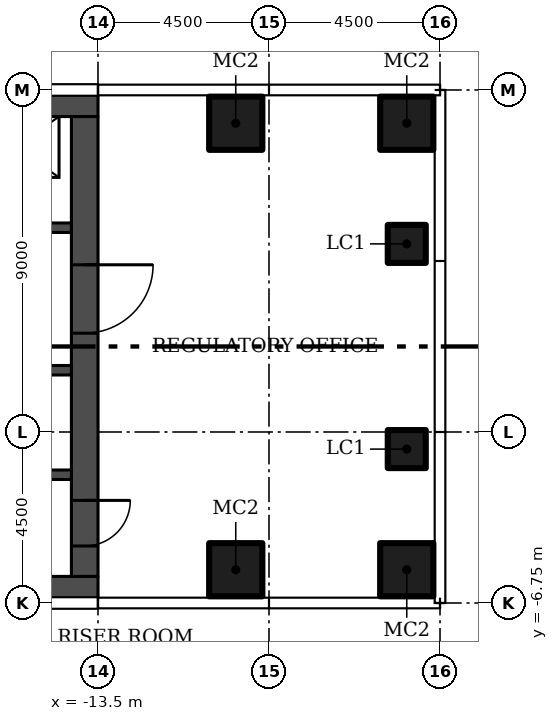
"""IFC4 building model, lengths in metres.
Left out: names, types, materials, properties, quantities, classifications, styles, units other than length and angle.
Written with IfcOpenShell. Run it as: python <this file> out.ifc"""

import sys

from ifc_helpers import new_model, si_unit, direction, frame, frame_2d, origin, origin_2d, place, context, subcontext, project, spatial, rectangle, hollow_rectangle, extrude, element, fill, save


model = new_model("IFC4")
c1 = context("Model", 3, precision=1e-05, world=origin(), true_north=direction((0.0, 1.0)))
c2 = subcontext(c1, "Body", "Model", "MODEL_VIEW")
j1 = project(units=[si_unit("LENGTHUNIT", "METRE"), si_unit("PLANEANGLEUNIT", "RADIAN")], contexts=[c1])
p1 = place(None, origin())
s1 = spatial("IfcSite", under=j1, at=p1, CompositionType="ELEMENT")
p2 = place(p1, origin())
s2 = spatial("IfcBuilding", under=s1, at=p2, CompositionType="ELEMENT")
p3 = place(p2, frame((0.0, 0.0, 69.3)))
s3 = spatial("IfcBuildingStorey", under=s2, at=p3, CompositionType="ELEMENT", Elevation=69.3)
for number, where in (
    (1, (-9.875, -5.875, 0.0)),
    (2, (-5.375, -5.875, 0.0)),
    (3, (-9.875, 5.875, 0.0)),
    (4, (-5.375, 5.875, 0.0)),
):
    element("IfcColumn", number, at=place(p3, frame(where)), inside=s3, PredefinedType="COLUMN", context=c2, shape_type="SweptSolid", body=[
        extrude(hollow_rectangle(XDim=1.4, YDim=1.4, WallThickness=0.05, at=origin_2d()), origin(), (0.0, 0.0, 1.0), 3.55),
    ])
for number, where in (
    (5, (-5.375, -2.7, 0.0)),
    (6, (-5.375, 2.7, 0.0)),
):
    element("IfcColumn", number, at=place(p3, frame(where)), inside=s3, PredefinedType="COLUMN", context=c2, shape_type="SweptSolid", body=[
        extrude(hollow_rectangle(XDim=1.0, YDim=1.0, WallThickness=0.04, at=origin_2d()), origin(), (0.0, 0.0, 1.0), 3.55),
    ])
for number, where in (
    (7, (-27.0, -6.4, 0.0)),
    (8, (-27.0, 6.4, 0.0)),
):
    element("IfcWall", number, at=place(p3, frame(where)), inside=s3, PredefinedType="SHEAR", context=c2, shape_type="SweptSolid", body=[
        extrude(rectangle(XDim=13.5, YDim=0.7, at=frame_2d((6.75, 0.0))), origin(), (0.0, 0.0, 1.0), 3.55),
    ])
p4 = place(p3, frame((-13.85, 6.05, 0.0), z_axis=(0.0, 0.0, 1.0), x_axis=(0.0, -1.0, 0.0)))
e9 = element("IfcWall", 9, at=p4, inside=s3, PredefinedType="SHEAR", context=c2, shape_type="SweptSolid", body=[
    extrude(rectangle(XDim=12.1, YDim=0.7, at=frame_2d((6.05, 0.0))), origin(), (0.0, 0.0, 1.0), 3.55),
])
p5 = place(p4, frame((10.1, 0.0, 0.0)))
e10 = element("IfcOpeningElement", 10, at=p5, cuts=e9, PredefinedType="OPENING", context=c2, shape_type="SweptSolid", body=[
    extrude(rectangle(XDim=1.2, YDim=2.1, at=frame_2d((0.6, 1.05))), frame((0.0, 0.36, 0.0), z_axis=(0.0, -1.0, 0.0), x_axis=(1.0, 0.0, 0.0)), (0.0, 0.0, 1.0), 0.72),
])
p6 = place(p4, frame((3.9, 0.0, 0.0)))
e11 = element("IfcOpeningElement", 11, at=p6, cuts=e9, PredefinedType="OPENING", context=c2, shape_type="SweptSolid", body=[
    extrude(rectangle(XDim=1.8, YDim=2.4, at=frame_2d((0.9, 1.2))), frame((0.0, 0.36, 0.0), z_axis=(0.0, -1.0, 0.0), x_axis=(1.0, 0.0, 0.0)), (0.0, 0.0, 1.0), 0.72),
])
p7 = place(p3, frame((-14.2, -3.375, 0.0), z_axis=(0.0, 0.0, 1.0), x_axis=(-1.0, 0.0, 0.0)))
e12 = element("IfcWall", 12, at=p7, inside=s3, PredefinedType="SHEAR", context=c2, shape_type="SweptSolid", body=[
    extrude(rectangle(XDim=12.1, YDim=0.25, at=frame_2d((6.05, 0.0))), origin(), (0.0, 0.0, 1.0), 3.55),
])
p8 = place(p7, frame((10.95, 0.0, 0.0)))
e13 = element("IfcOpeningElement", 13, at=p8, cuts=e12, PredefinedType="OPENING", context=c2, shape_type="SweptSolid", body=[
    extrude(rectangle(XDim=1.1, YDim=2.1, at=frame_2d((0.55, 1.05))), frame((0.0, 0.135, 0.0), z_axis=(0.0, -1.0, 0.0), x_axis=(1.0, 0.0, 0.0)), (0.0, 0.0, 1.0), 0.27),
])
p9 = place(p3, frame((-14.2, -0.625, 0.0), z_axis=(0.0, 0.0, 1.0), x_axis=(-1.0, 0.0, 0.0)))
e14 = element("IfcWall", 14, at=p9, inside=s3, PredefinedType="SHEAR", context=c2, shape_type="SweptSolid", body=[
    extrude(rectangle(XDim=12.1, YDim=0.25, at=frame_2d((6.05, 0.0))), origin(), (0.0, 0.0, 1.0), 3.55),
])
p10 = place(p9, frame((8.65, 0.0, 0.0)))
e15 = element("IfcOpeningElement", 15, at=p10, cuts=e14, PredefinedType="OPENING", context=c2, shape_type="SweptSolid", body=[
    extrude(rectangle(XDim=1.2, YDim=2.1, at=frame_2d((0.6, 1.05))), frame((0.0, 0.135, 0.0), z_axis=(0.0, -1.0, 0.0), x_axis=(1.0, 0.0, 0.0)), (0.0, 0.0, 1.0), 0.27),
])
p11 = place(p9, frame((1.175, 0.0, 0.0)))
e16 = element("IfcOpeningElement", 16, at=p11, cuts=e14, PredefinedType="OPENING", context=c2, shape_type="SweptSolid", body=[
    extrude(rectangle(XDim=0.9, YDim=2.1, at=frame_2d((0.45, 1.05))), frame((0.0, 0.135, 0.0), z_axis=(0.0, -1.0, 0.0), x_axis=(1.0, 0.0, 0.0)), (0.0, 0.0, 1.0), 0.27),
])
p12 = place(p3, frame((-26.3, 3.125, 0.0)))
e17 = element("IfcWall", 17, at=p12, inside=s3, PredefinedType="SHEAR", context=c2, shape_type="SweptSolid", body=[
    extrude(rectangle(XDim=12.1, YDim=0.25, at=frame_2d((6.05, 0.0))), origin(), (0.0, 0.0, 1.0), 3.55),
])
p13 = place(p12, frame((0.85, 0.0, 0.0)))
e18 = element("IfcOpeningElement", 18, at=p13, cuts=e17, PredefinedType="OPENING", context=c2, shape_type="SweptSolid", body=[
    extrude(rectangle(XDim=1.1, YDim=2.1, at=frame_2d((0.55, 1.05))), frame((0.0, 0.135, 0.0), z_axis=(0.0, -1.0, 0.0), x_axis=(1.0, 0.0, 0.0)), (0.0, 0.0, 1.0), 0.27),
])
p14 = place(p12, frame((3.9, 0.0, 0.0)))
e19 = element("IfcOpeningElement", 19, at=p14, cuts=e17, PredefinedType="OPENING", context=c2, shape_type="SweptSolid", body=[
    extrude(rectangle(XDim=1.1, YDim=2.1, at=frame_2d((0.55, 1.05))), frame((0.0, 0.135, 0.0), z_axis=(0.0, -1.0, 0.0), x_axis=(1.0, 0.0, 0.0)), (0.0, 0.0, 1.0), 0.27),
])
p15 = place(p5, origin())
e20 = element("IfcDoor", 20, at=p15, inside=s3, OperationType="SINGLE_SWING_RIGHT", PredefinedType="DOOR", context=c2, shape_type="SweptSolid", body=[
    extrude(rectangle(XDim=1.2, YDim=2.1, at=frame_2d((0.6, 1.05))), frame((0.0, 0.025, 0.0), z_axis=(0.0, -1.0, 0.0), x_axis=(1.0, 0.0, 0.0)), (0.0, 0.0, 1.0), 0.05),
])
fill(e10, e20)
p16 = place(p6, origin())
e21 = element("IfcDoor", 21, at=p16, inside=s3, OperationType="DOUBLE_DOOR_SINGLE_SWING", PredefinedType="DOOR", context=c2, shape_type="SweptSolid", body=[
    extrude(rectangle(XDim=1.8, YDim=2.4, at=frame_2d((0.9, 1.2))), frame((0.0, 0.025, 0.0), z_axis=(0.0, -1.0, 0.0), x_axis=(1.0, 0.0, 0.0)), (0.0, 0.0, 1.0), 0.05),
])
fill(e11, e21)
save(model, sys.argv[1])
